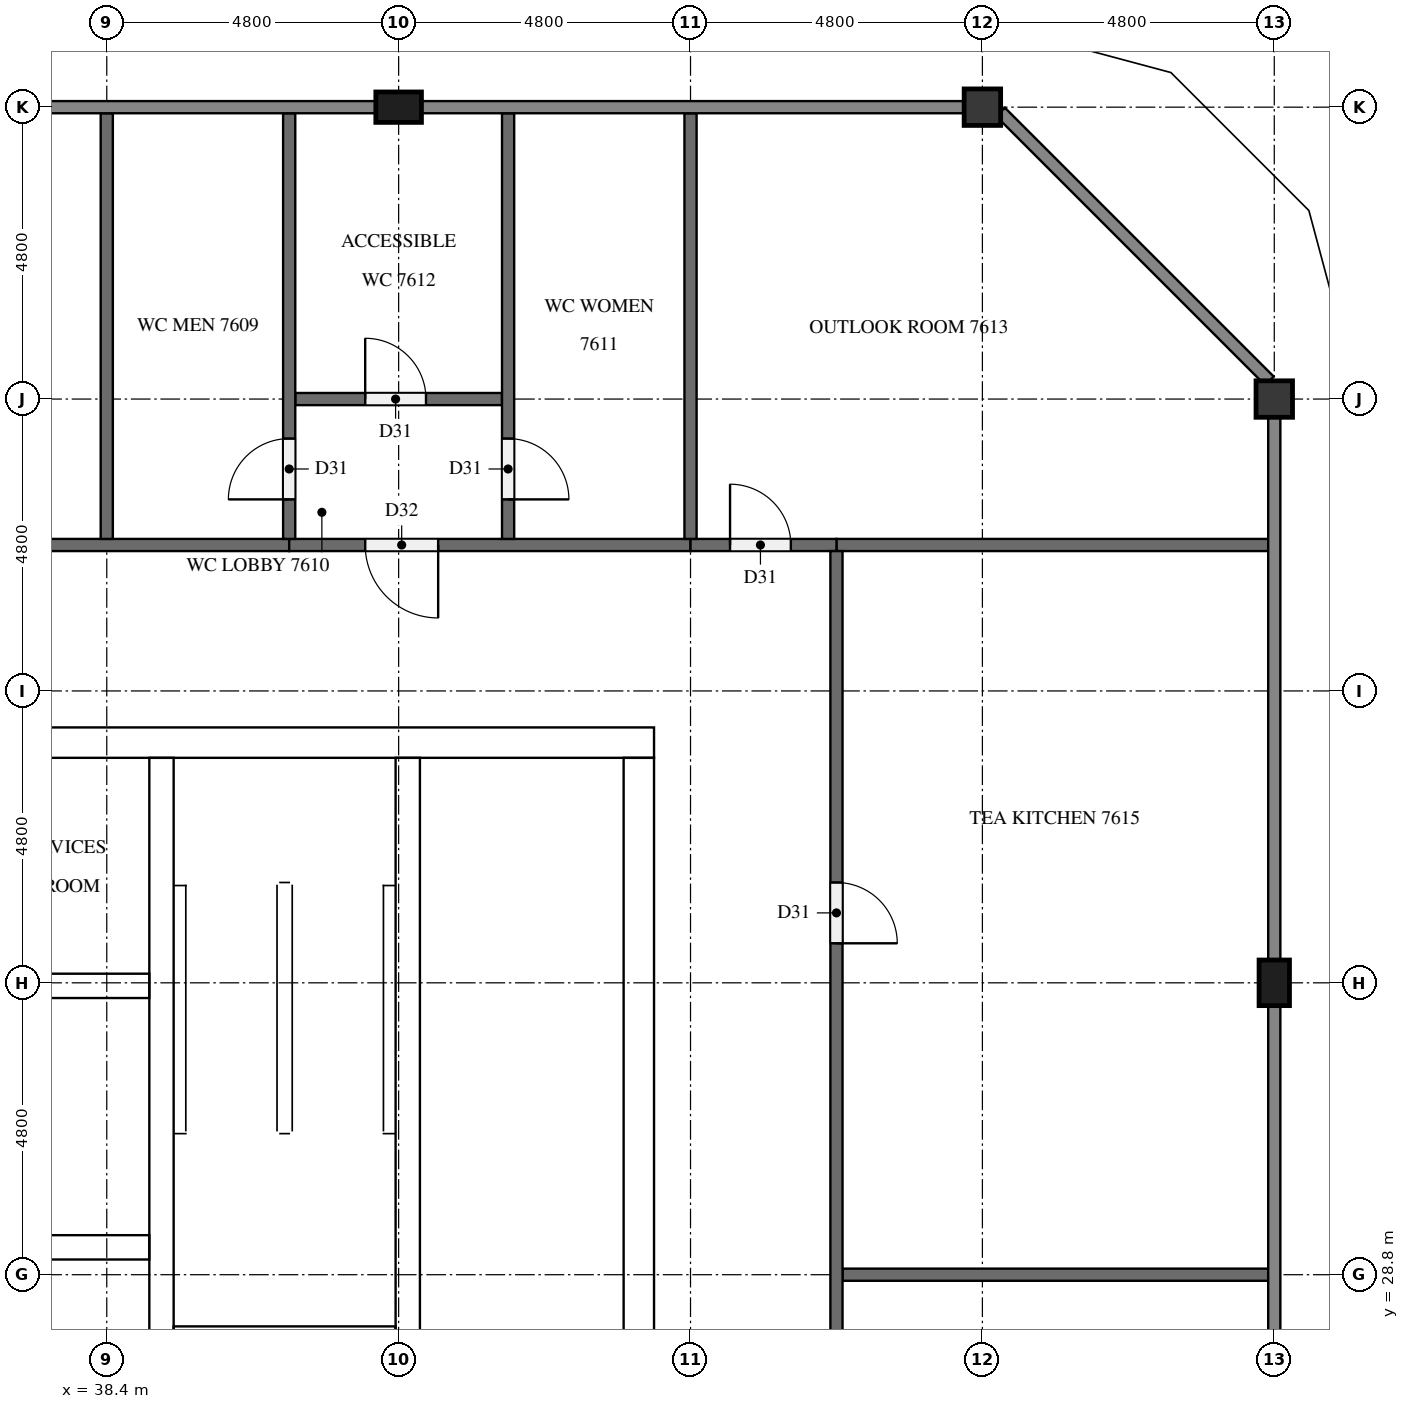
"""IFC4 building model, lengths in metres.
Left out: names, types, materials, properties, quantities, classifications, styles, units other than length and angle.
Written with IfcOpenShell. Run it as: python <this file> out.ifc"""

import sys

from ifc_helpers import new_model, si_unit, direction, frame, frame_2d, origin, origin_2d, place, context, subcontext, project, spatial, rectangle, extrude, element, fill, save


model = new_model("IFC4")
c1 = context("Model", 3, precision=1e-05, world=origin(), true_north=direction((0.0, 1.0)))
c2 = subcontext(c1, "Body", "Model", "MODEL_VIEW")
j1 = project(units=[si_unit("LENGTHUNIT", "METRE"), si_unit("PLANEANGLEUNIT", "RADIAN")], contexts=[c1])
p1 = place(None, origin())
s1 = spatial("IfcSite", under=j1, at=p1, CompositionType="ELEMENT")
p2 = place(p1, origin())
s2 = spatial("IfcBuilding", under=s1, at=p2, CompositionType="ELEMENT")
p3 = place(p2, frame((0.0, 0.0, 291.5)))
s3 = spatial("IfcBuildingStorey", under=s2, at=p3, CompositionType="ELEMENT", Elevation=291.5)
p4 = place(p3, frame((15.0, 37.55, 0.0), z_axis=(0.0, 0.0, 1.0), x_axis=(1.0, 0.0, 0.0)))
e1 = element("IfcWall", 1, at=p4, inside=s3, PredefinedType="SHEAR", context=c2, shape_type="SweptSolid", body=[
    extrude(rectangle(XDim=32.4, YDim=0.5, at=frame_2d((16.2, 0.0))), origin(), (0.0, 0.0, 1.0), 4.4),
])
p5 = place(p4, frame((15.3, 0.0, 0.0)))
e2 = element("IfcOpeningElement", 2, at=p5, cuts=e1, PredefinedType="OPENING", context=c2, shape_type="SweptSolid", body=[
    extrude(rectangle(XDim=1.8, YDim=2.1, at=frame_2d((0.9, 1.05))), frame((0.0, 0.26, 0.0), z_axis=(0.0, -1.0, 0.0), x_axis=(1.0, 0.0, 0.0)), (0.0, 0.0, 1.0), 0.52),
])
p6 = place(p4, frame((1.282, 0.0, 0.0)))
e3 = element("IfcOpeningElement", 3, at=p6, cuts=e1, PredefinedType="OPENING", context=c2, shape_type="SweptSolid", body=[
    extrude(rectangle(XDim=1.0, YDim=2.1, at=frame_2d((0.5, 1.05))), frame((0.0, 0.26, 0.0), z_axis=(0.0, -1.0, 0.0), x_axis=(1.0, 0.0, 0.0)), (0.0, 0.0, 1.0), 0.52),
])
p7 = place(p4, frame((5.082, 0.0, 0.0)))
e4 = element("IfcOpeningElement", 4, at=p7, cuts=e1, PredefinedType="OPENING", context=c2, shape_type="SweptSolid", body=[
    extrude(rectangle(XDim=1.0, YDim=2.1, at=frame_2d((0.5, 1.05))), frame((0.0, 0.26, 0.0), z_axis=(0.0, -1.0, 0.0), x_axis=(1.0, 0.0, 0.0)), (0.0, 0.0, 1.0), 0.52),
])
p8 = place(p3, frame((47.15, 15.5, 0.0), z_axis=(0.0, 0.0, 1.0), x_axis=(0.0, 1.0, 0.0)))
e5 = element("IfcWall", 5, at=p8, inside=s3, PredefinedType="SHEAR", context=c2, shape_type="SweptSolid", body=[
    extrude(rectangle(XDim=21.8, YDim=0.5, at=frame_2d((10.9, 0.0))), origin(), (0.0, 0.0, 1.0), 4.4),
])
p9 = place(p8, frame((10.6, 0.0, 0.0)))
e6 = element("IfcOpeningElement", 6, at=p9, cuts=e5, PredefinedType="OPENING", context=c2, shape_type="SweptSolid", body=[
    extrude(rectangle(XDim=1.2, YDim=2.1, at=frame_2d((0.6, 1.05))), frame((0.0, 0.26, 0.0), z_axis=(0.0, -1.0, 0.0), x_axis=(1.0, 0.0, 0.0)), (0.0, 0.0, 1.0), 0.52),
])
p10 = place(p3, frame((39.3, 27.75, 0.0), z_axis=(0.0, 0.0, 1.0), x_axis=(0.0, 1.0, 0.0)))
e7 = element("IfcWall", 7, at=p10, inside=s3, PredefinedType="SHEAR", context=c2, shape_type="SweptSolid", body=[
    extrude(rectangle(XDim=9.55, YDim=0.4, at=frame_2d((4.775, 0.0))), origin(), (0.0, 0.0, 1.0), 4.4),
])
p11 = place(p3, frame((43.35, 27.75, 0.0), z_axis=(0.0, 0.0, 1.0), x_axis=(0.0, 1.0, 0.0)))
e8 = element("IfcWall", 8, at=p11, inside=s3, PredefinedType="SHEAR", context=c2, shape_type="SweptSolid", body=[
    extrude(rectangle(XDim=9.55, YDim=0.4, at=frame_2d((4.775, 0.0))), origin(), (0.0, 0.0, 1.0), 4.4),
])
p12 = place(p11, frame((7.65, 0.0, 0.0)))
e9 = element("IfcOpeningElement", 9, at=p12, cuts=e8, PredefinedType="OPENING", context=c2, shape_type="SweptSolid", body=[
    extrude(rectangle(XDim=1.2, YDim=2.1, at=frame_2d((0.6, 1.05))), frame((0.0, 0.21, 0.0), z_axis=(0.0, -1.0, 0.0), x_axis=(1.0, 0.0, 0.0)), (0.0, 0.0, 1.0), 0.42),
])
p13 = place(p3, frame((39.5, 27.75, 0.0), z_axis=(0.0, 0.0, 1.0), x_axis=(1.0, 0.0, 0.0)))
e10 = element("IfcWall", 10, at=p13, inside=s3, PredefinedType="SHEAR", context=c2, shape_type="SweptSolid", body=[
    extrude(rectangle(XDim=3.65, YDim=0.4, at=frame_2d((1.825, 0.0))), origin(), (0.0, 0.0, 1.0), 4.4),
])
p14 = place(p3, frame((23.3, 29.25, 0.0), z_axis=(0.0, 0.0, 1.0), x_axis=(1.0, 0.0, 0.0)))
e11 = element("IfcWall", 11, at=p14, inside=s3, PredefinedType="SHEAR", context=c2, shape_type="SweptSolid", body=[
    extrude(rectangle(XDim=15.8, YDim=0.4, at=frame_2d((7.9, 0.0))), origin(), (0.0, 0.0, 1.0), 4.4),
])
p15 = place(p14, frame((0.683, 0.0, 0.0)))
e12 = element("IfcOpeningElement", 12, at=p15, cuts=e11, PredefinedType="OPENING", context=c2, shape_type="SweptSolid", body=[
    extrude(rectangle(XDim=1.1, YDim=2.1, at=frame_2d((0.55, 1.05))), frame((0.0, 0.21, 0.0), z_axis=(0.0, -1.0, 0.0), x_axis=(1.0, 0.0, 0.0)), (0.0, 0.0, 1.0), 0.42),
])
p16 = place(p14, frame((3.35, 0.0, 0.0)))
e13 = element("IfcOpeningElement", 13, at=p16, cuts=e11, PredefinedType="OPENING", context=c2, shape_type="SweptSolid", body=[
    extrude(rectangle(XDim=1.1, YDim=2.1, at=frame_2d((0.55, 1.05))), frame((0.0, 0.21, 0.0), z_axis=(0.0, -1.0, 0.0), x_axis=(1.0, 0.0, 0.0)), (0.0, 0.0, 1.0), 0.42),
])
p17 = place(p14, frame((6.017, 0.0, 0.0)))
e14 = element("IfcOpeningElement", 14, at=p17, cuts=e11, PredefinedType="OPENING", context=c2, shape_type="SweptSolid", body=[
    extrude(rectangle(XDim=1.1, YDim=2.1, at=frame_2d((0.55, 1.05))), frame((0.0, 0.21, 0.0), z_axis=(0.0, -1.0, 0.0), x_axis=(1.0, 0.0, 0.0)), (0.0, 0.0, 1.0), 0.42),
])
p18 = place(p14, frame((8.683, 0.0, 0.0)))
e15 = element("IfcOpeningElement", 15, at=p18, cuts=e11, PredefinedType="OPENING", context=c2, shape_type="SweptSolid", body=[
    extrude(rectangle(XDim=1.1, YDim=2.1, at=frame_2d((0.55, 1.05))), frame((0.0, 0.21, 0.0), z_axis=(0.0, -1.0, 0.0), x_axis=(1.0, 0.0, 0.0)), (0.0, 0.0, 1.0), 0.42),
])
p19 = place(p14, frame((11.35, 0.0, 0.0)))
e16 = element("IfcOpeningElement", 16, at=p19, cuts=e11, PredefinedType="OPENING", context=c2, shape_type="SweptSolid", body=[
    extrude(rectangle(XDim=1.1, YDim=2.1, at=frame_2d((0.55, 1.05))), frame((0.0, 0.21, 0.0), z_axis=(0.0, -1.0, 0.0), x_axis=(1.0, 0.0, 0.0)), (0.0, 0.0, 1.0), 0.42),
])
p20 = place(p14, frame((14.017, 0.0, 0.0)))
e17 = element("IfcOpeningElement", 17, at=p20, cuts=e11, PredefinedType="OPENING", context=c2, shape_type="SweptSolid", body=[
    extrude(rectangle(XDim=1.1, YDim=2.1, at=frame_2d((0.55, 1.05))), frame((0.0, 0.21, 0.0), z_axis=(0.0, -1.0, 0.0), x_axis=(1.0, 0.0, 0.0)), (0.0, 0.0, 1.0), 0.42),
])
p21 = place(p3, frame((33.5, 33.55, 0.0), z_axis=(0.0, 0.0, 1.0), x_axis=(1.0, 0.0, 0.0)))
e18 = element("IfcWall", 18, at=p21, inside=s3, PredefinedType="SHEAR", context=c2, shape_type="SweptSolid", body=[
    extrude(rectangle(XDim=5.6, YDim=0.4, at=frame_2d((2.8, 0.0))), origin(), (0.0, 0.0, 1.0), 4.4),
])
p22 = place(p21, frame((0.578, 0.0, 0.0)))
e19 = element("IfcOpeningElement", 19, at=p22, cuts=e18, PredefinedType="OPENING", context=c2, shape_type="SweptSolid", body=[
    extrude(rectangle(XDim=1.0, YDim=2.1, at=frame_2d((0.5, 1.05))), frame((0.0, 0.21, 0.0), z_axis=(0.0, -1.0, 0.0), x_axis=(1.0, 0.0, 0.0)), (0.0, 0.0, 1.0), 0.42),
])
p23 = place(p21, frame((3.278, 0.0, 0.0)))
e20 = element("IfcOpeningElement", 20, at=p23, cuts=e18, PredefinedType="OPENING", context=c2, shape_type="SweptSolid", body=[
    extrude(rectangle(XDim=1.0, YDim=2.1, at=frame_2d((0.5, 1.05))), frame((0.0, 0.21, 0.0), z_axis=(0.0, -1.0, 0.0), x_axis=(1.0, 0.0, 0.0)), (0.0, 0.0, 1.0), 0.42),
])
p24 = place(p3, frame((57.6, 33.6, 0.0), z_axis=(0.0, 0.0, 1.0), x_axis=(0.0, 1.0, 0.0)))
e21 = element("IfcColumn", 21, at=p24, inside=s3, PredefinedType="COLUMN", context=c2, shape_type="SweptSolid", body=[
    extrude(rectangle(XDim=0.75, YDim=0.5, at=origin_2d()), origin(), (0.0, 0.0, 1.0), 4.4),
])
for number, where, z_axis, x_axis in (
    (22, (57.6, 43.2, 0.0), (0.0, 0.0, 1.0), (1.0, 0.0, 0.0)),
    (23, (52.8, 48.0, 0.0), (0.0, 0.0, 1.0), (1.0, 0.0, 0.0)),
):
    element("IfcColumn", number, at=place(p3, frame(where, z_axis=z_axis, x_axis=x_axis)), inside=s3, PredefinedType="COLUMN", context=c2, shape_type="SweptSolid", body=[
        extrude(rectangle(XDim=0.6, YDim=0.6, at=origin_2d()), origin(), (0.0, 0.0, 1.0), 4.4),
    ])
p25 = place(p3, frame((43.2, 48.0, 0.0), z_axis=(0.0, 0.0, 1.0), x_axis=(1.0, 0.0, 0.0)))
e24 = element("IfcColumn", 24, at=p25, inside=s3, PredefinedType="COLUMN", context=c2, shape_type="SweptSolid", body=[
    extrude(rectangle(XDim=0.75, YDim=0.5, at=origin_2d()), origin(), (0.0, 0.0, 1.0), 4.4),
])
p26 = place(p3, frame((50.5, 28.8, 0.0), z_axis=(0.0, 0.0, 1.0), x_axis=(1.0, 0.0, 0.0)))
e25 = element("IfcWall", 25, at=p26, inside=s3, PredefinedType="PARTITIONING", context=c2, shape_type="SweptSolid", body=[
    extrude(rectangle(XDim=7.0, YDim=0.2, at=frame_2d((3.5, 0.0))), origin(), (0.0, 0.0, 1.0), 4.4),
])
p27 = place(p3, frame((50.4, 40.8, 0.0), z_axis=(0.0, 0.0, 1.0), x_axis=(1.0, 0.0, 0.0)))
e26 = element("IfcWall", 26, at=p27, inside=s3, PredefinedType="PARTITIONING", context=c2, shape_type="SweptSolid", body=[
    extrude(rectangle(XDim=7.1, YDim=0.2, at=frame_2d((3.55, 0.0))), origin(), (0.0, 0.0, 1.0), 4.4),
])
p28 = place(p3, frame((12.0, 40.8, 0.0), z_axis=(0.0, 0.0, 1.0), x_axis=(1.0, 0.0, 0.0)))
e27 = element("IfcWall", 27, at=p28, inside=s3, PredefinedType="PARTITIONING", context=c2, shape_type="SweptSolid", body=[
    extrude(rectangle(XDim=29.4, YDim=0.2, at=frame_2d((14.7, 0.0))), origin(), (0.0, 0.0, 1.0), 4.4),
])
p29 = place(p28, frame((3.05, 0.0, 0.0)))
e28 = element("IfcOpeningElement", 28, at=p29, cuts=e27, PredefinedType="OPENING", context=c2, shape_type="SweptSolid", body=[
    extrude(rectangle(XDim=1.0, YDim=2.1, at=frame_2d((0.5, 1.05))), frame((0.0, 0.11, 0.0), z_axis=(0.0, -1.0, 0.0), x_axis=(1.0, 0.0, 0.0)), (0.0, 0.0, 1.0), 0.22),
])
p30 = place(p28, frame((16.25, 0.0, 0.0)))
e29 = element("IfcOpeningElement", 29, at=p30, cuts=e27, PredefinedType="OPENING", context=c2, shape_type="SweptSolid", body=[
    extrude(rectangle(XDim=1.0, YDim=2.1, at=frame_2d((0.5, 1.05))), frame((0.0, 0.11, 0.0), z_axis=(0.0, -1.0, 0.0), x_axis=(1.0, 0.0, 0.0)), (0.0, 0.0, 1.0), 0.22),
])
p31 = place(p3, frame((48.0, 40.8, 0.0), z_axis=(0.0, 0.0, 1.0), x_axis=(-1.0, 0.0, 0.0)))
e30 = element("IfcWall", 30, at=p31, inside=s3, PredefinedType="PARTITIONING", context=c2, shape_type="SweptSolid", body=[
    extrude(rectangle(XDim=6.6, YDim=0.2, at=frame_2d((3.3, 0.0))), origin(), (0.0, 0.0, 1.0), 4.4),
])
p32 = place(p31, frame((4.15, 0.0, 0.0)))
e31 = element("IfcOpeningElement", 31, at=p32, cuts=e30, PredefinedType="OPENING", context=c2, shape_type="SweptSolid", body=[
    extrude(rectangle(XDim=1.2, YDim=2.1, at=frame_2d((0.6, 1.05))), frame((0.0, 0.11, 0.0), z_axis=(0.0, -1.0, 0.0), x_axis=(1.0, 0.0, 0.0)), (0.0, 0.0, 1.0), 0.22),
])
p33 = place(p3, frame((48.0, 40.8, 0.0), z_axis=(0.0, 0.0, 1.0), x_axis=(1.0, 0.0, 0.0)))
e32 = element("IfcWall", 32, at=p33, inside=s3, PredefinedType="PARTITIONING", context=c2, shape_type="SweptSolid", body=[
    extrude(rectangle(XDim=2.4, YDim=0.2, at=frame_2d((1.2, 0.0))), origin(), (0.0, 0.0, 1.0), 4.4),
])
p34 = place(p33, frame((0.65, 0.0, 0.0)))
e33 = element("IfcOpeningElement", 33, at=p34, cuts=e32, PredefinedType="OPENING", context=c2, shape_type="SweptSolid", body=[
    extrude(rectangle(XDim=1.0, YDim=2.1, at=frame_2d((0.5, 1.05))), frame((0.0, 0.11, 0.0), z_axis=(0.0, -1.0, 0.0), x_axis=(1.0, 0.0, 0.0)), (0.0, 0.0, 1.0), 0.22),
])
p35 = place(p3, frame((41.5, 43.2, 0.0), z_axis=(0.0, 0.0, 1.0), x_axis=(1.0, 0.0, 0.0)))
e34 = element("IfcWall", 34, at=p35, inside=s3, PredefinedType="PARTITIONING", context=c2, shape_type="SweptSolid", body=[
    extrude(rectangle(XDim=3.4, YDim=0.2, at=frame_2d((1.7, 0.0))), origin(), (0.0, 0.0, 1.0), 4.4),
])
p36 = place(p35, frame((1.15, 0.0, 0.0)))
e35 = element("IfcOpeningElement", 35, at=p36, cuts=e34, PredefinedType="OPENING", context=c2, shape_type="SweptSolid", body=[
    extrude(rectangle(XDim=1.0, YDim=2.1, at=frame_2d((0.5, 1.05))), frame((0.0, 0.11, 0.0), z_axis=(0.0, -1.0, 0.0), x_axis=(1.0, 0.0, 0.0)), (0.0, 0.0, 1.0), 0.22),
])
p37 = place(p3, frame((38.4, 40.9, 0.0), z_axis=(0.0, 0.0, 1.0), x_axis=(0.0, 1.0, 0.0)))
e36 = element("IfcWall", 36, at=p37, inside=s3, PredefinedType="PARTITIONING", context=c2, shape_type="SweptSolid", body=[
    extrude(rectangle(XDim=7.0, YDim=0.2, at=frame_2d((3.5, 0.0))), origin(), (0.0, 0.0, 1.0), 4.4),
])
p38 = place(p3, frame((41.4, 40.9, 0.0), z_axis=(0.0, 0.0, 1.0), x_axis=(0.0, 1.0, 0.0)))
e37 = element("IfcWall", 37, at=p38, inside=s3, PredefinedType="PARTITIONING", context=c2, shape_type="SweptSolid", body=[
    extrude(rectangle(XDim=7.0, YDim=0.2, at=frame_2d((3.5, 0.0))), origin(), (0.0, 0.0, 1.0), 4.4),
])
p39 = place(p38, frame((0.65, 0.0, 0.0)))
e38 = element("IfcOpeningElement", 38, at=p39, cuts=e37, PredefinedType="OPENING", context=c2, shape_type="SweptSolid", body=[
    extrude(rectangle(XDim=1.0, YDim=2.1, at=frame_2d((0.5, 1.05))), frame((0.0, 0.11, 0.0), z_axis=(0.0, -1.0, 0.0), x_axis=(1.0, 0.0, 0.0)), (0.0, 0.0, 1.0), 0.22),
])
p40 = place(p3, frame((45.0, 47.9, 0.0), z_axis=(0.0, 0.0, 1.0), x_axis=(0.0, -1.0, 0.0)))
e39 = element("IfcWall", 39, at=p40, inside=s3, PredefinedType="PARTITIONING", context=c2, shape_type="SweptSolid", body=[
    extrude(rectangle(XDim=7.0, YDim=0.2, at=frame_2d((3.5, 0.0))), origin(), (0.0, 0.0, 1.0), 4.4),
])
p41 = place(p40, frame((5.35, 0.0, 0.0)))
e40 = element("IfcOpeningElement", 40, at=p41, cuts=e39, PredefinedType="OPENING", context=c2, shape_type="SweptSolid", body=[
    extrude(rectangle(XDim=1.0, YDim=2.1, at=frame_2d((0.5, 1.05))), frame((0.0, 0.11, 0.0), z_axis=(0.0, -1.0, 0.0), x_axis=(1.0, 0.0, 0.0)), (0.0, 0.0, 1.0), 0.22),
])
p42 = place(p3, frame((48.0, 40.9, 0.0), z_axis=(0.0, 0.0, 1.0), x_axis=(0.0, 1.0, 0.0)))
e41 = element("IfcWall", 41, at=p42, inside=s3, PredefinedType="PARTITIONING", context=c2, shape_type="SweptSolid", body=[
    extrude(rectangle(XDim=7.0, YDim=0.2, at=frame_2d((3.5, 0.0))), origin(), (0.0, 0.0, 1.0), 4.4),
])
p43 = place(p3, frame((50.4, 40.7, 0.0), z_axis=(0.0, 0.0, 1.0), x_axis=(0.0, -1.0, 0.0)))
e42 = element("IfcWall", 42, at=p43, inside=s3, PredefinedType="PARTITIONING", context=c2, shape_type="SweptSolid", body=[
    extrude(rectangle(XDim=28.6, YDim=0.2, at=frame_2d((14.3, 0.0))), origin(), (0.0, 0.0, 1.0), 4.4),
])
p44 = place(p43, frame((19.75, 0.0, 0.0)))
e43 = element("IfcOpeningElement", 43, at=p44, cuts=e42, PredefinedType="OPENING", context=c2, shape_type="SweptSolid", body=[
    extrude(rectangle(XDim=1.0, YDim=2.1, at=frame_2d((0.5, 1.05))), frame((0.0, 0.11, 0.0), z_axis=(0.0, -1.0, 0.0), x_axis=(1.0, 0.0, 0.0)), (0.0, 0.0, 1.0), 0.22),
])
p45 = place(p43, frame((5.45, 0.0, 0.0)))
e44 = element("IfcOpeningElement", 44, at=p45, cuts=e42, PredefinedType="OPENING", context=c2, shape_type="SweptSolid", body=[
    extrude(rectangle(XDim=1.0, YDim=2.1, at=frame_2d((0.5, 1.05))), frame((0.0, 0.11, 0.0), z_axis=(0.0, -1.0, 0.0), x_axis=(1.0, 0.0, 0.0)), (0.0, 0.0, 1.0), 0.22),
])
p46 = place(p20, origin())
e45 = element("IfcDoor", 45, at=p46, inside=s3, OperationType="DOUBLE_DOOR_SLIDING", PredefinedType="DOOR", context=c2, shape_type="SweptSolid", body=[
    extrude(rectangle(XDim=1.1, YDim=2.1, at=frame_2d((0.55, 1.05))), frame((0.0, 0.025, 0.0), z_axis=(0.0, -1.0, 0.0), x_axis=(1.0, 0.0, 0.0)), (0.0, 0.0, 1.0), 0.05),
])
fill(e17, e45)
p47 = place(p12, origin())
e46 = element("IfcDoor", 46, at=p47, inside=s3, OperationType="SINGLE_SWING_RIGHT", PredefinedType="DOOR", context=c2, shape_type="SweptSolid", body=[
    extrude(rectangle(XDim=1.2, YDim=2.1, at=frame_2d((0.6, 1.05))), frame((0.0, 0.025, 0.0), z_axis=(0.0, -1.0, 0.0), x_axis=(1.0, 0.0, 0.0)), (0.0, 0.0, 1.0), 0.05),
])
fill(e9, e46)
p48 = place(p23, frame((1.0, 0.0, 0.0), z_axis=(0.0, 0.0, 1.0), x_axis=(-1.0, 0.0, 0.0)))
e47 = element("IfcDoor", 47, at=p48, inside=s3, OperationType="SINGLE_SWING_RIGHT", PredefinedType="DOOR", context=c2, shape_type="SweptSolid", body=[
    extrude(rectangle(XDim=1.0, YDim=2.1, at=frame_2d((0.5, 1.05))), frame((0.0, 0.025, 0.0), z_axis=(0.0, -1.0, 0.0), x_axis=(1.0, 0.0, 0.0)), (0.0, 0.0, 1.0), 0.05),
])
fill(e20, e47)
p49 = place(p32, origin())
e48 = element("IfcDoor", 48, at=p49, inside=s3, OperationType="SINGLE_SWING_LEFT", PredefinedType="DOOR", context=c2, shape_type="SweptSolid", body=[
    extrude(rectangle(XDim=1.2, YDim=2.1, at=frame_2d((0.6, 1.05))), frame((0.0, 0.025, 0.0), z_axis=(0.0, -1.0, 0.0), x_axis=(1.0, 0.0, 0.0)), (0.0, 0.0, 1.0), 0.05),
])
fill(e31, e48)
p50 = place(p39, origin())
e49 = element("IfcDoor", 49, at=p50, inside=s3, OperationType="SINGLE_SWING_LEFT", PredefinedType="DOOR", context=c2, shape_type="SweptSolid", body=[
    extrude(rectangle(XDim=1.0, YDim=2.1, at=frame_2d((0.5, 1.05))), frame((0.0, 0.025, 0.0), z_axis=(0.0, -1.0, 0.0), x_axis=(1.0, 0.0, 0.0)), (0.0, 0.0, 1.0), 0.05),
])
fill(e38, e49)
p51 = place(p41, origin())
e50 = element("IfcDoor", 50, at=p51, inside=s3, OperationType="SINGLE_SWING_RIGHT", PredefinedType="DOOR", context=c2, shape_type="SweptSolid", body=[
    extrude(rectangle(XDim=1.0, YDim=2.1, at=frame_2d((0.5, 1.05))), frame((0.0, 0.025, 0.0), z_axis=(0.0, -1.0, 0.0), x_axis=(1.0, 0.0, 0.0)), (0.0, 0.0, 1.0), 0.05),
])
fill(e40, e50)
p52 = place(p36, origin())
e51 = element("IfcDoor", 51, at=p52, inside=s3, OperationType="SINGLE_SWING_LEFT", PredefinedType="DOOR", context=c2, shape_type="SweptSolid", body=[
    extrude(rectangle(XDim=1.0, YDim=2.1, at=frame_2d((0.5, 1.05))), frame((0.0, 0.025, 0.0), z_axis=(0.0, -1.0, 0.0), x_axis=(1.0, 0.0, 0.0)), (0.0, 0.0, 1.0), 0.05),
])
fill(e35, e51)
p53 = place(p34, origin())
e52 = element("IfcDoor", 52, at=p53, inside=s3, OperationType="SINGLE_SWING_LEFT", PredefinedType="DOOR", context=c2, shape_type="SweptSolid", body=[
    extrude(rectangle(XDim=1.0, YDim=2.1, at=frame_2d((0.5, 1.05))), frame((0.0, 0.025, 0.0), z_axis=(0.0, -1.0, 0.0), x_axis=(1.0, 0.0, 0.0)), (0.0, 0.0, 1.0), 0.05),
])
fill(e33, e52)
p54 = place(p45, origin())
e53 = element("IfcDoor", 53, at=p54, inside=s3, OperationType="SINGLE_SWING_RIGHT", PredefinedType="DOOR", context=c2, shape_type="SweptSolid", body=[
    extrude(rectangle(XDim=1.0, YDim=2.1, at=frame_2d((0.5, 1.05))), frame((0.0, 0.025, 0.0), z_axis=(0.0, -1.0, 0.0), x_axis=(1.0, 0.0, 0.0)), (0.0, 0.0, 1.0), 0.05),
])
fill(e44, e53)
save(model, sys.argv[1])
